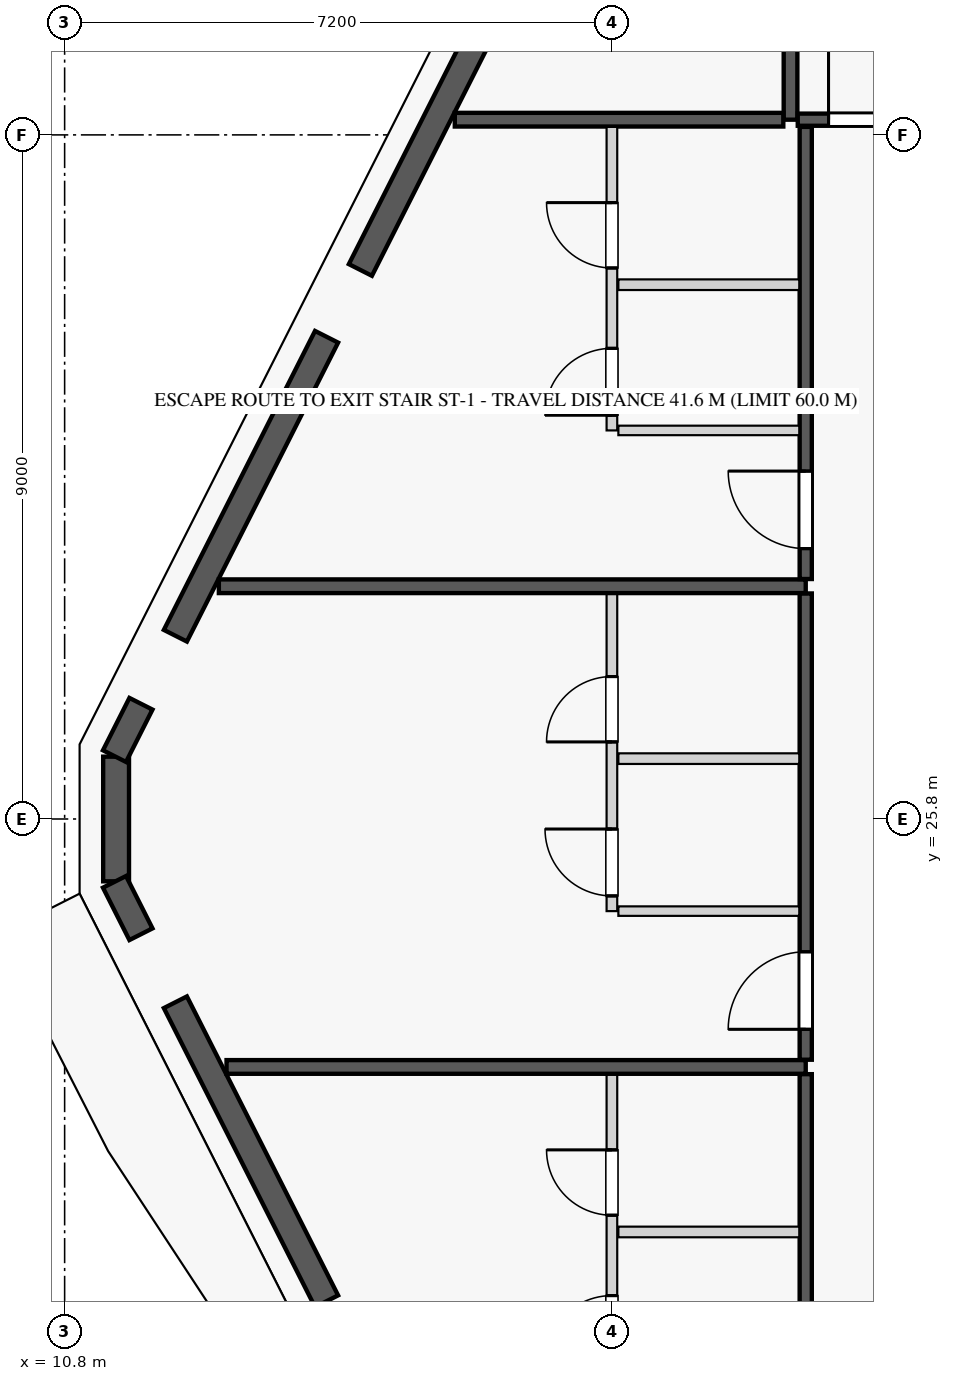
"""IFC4 building model, lengths in metres.
Left out: names, types, materials, properties, quantities, classifications, styles, units other than length and angle.
Written with IfcOpenShell. Run it as: python <this file> out.ifc"""

import sys

from ifc_helpers import new_model, si_unit, direction, frame, frame_2d, origin, origin_2d, place, context, subcontext, project, spatial, rectangle, extrude, element, fill, save


model = new_model("IFC4")
c1 = context("Model", 3, precision=1e-05, world=origin(), true_north=direction((0.0, 1.0)))
c2 = subcontext(c1, "Body", "Model", "MODEL_VIEW")
j1 = project(units=[si_unit("LENGTHUNIT", "METRE"), si_unit("PLANEANGLEUNIT", "RADIAN")], contexts=[c1])
p1 = place(None, origin())
s1 = spatial("IfcSite", under=j1, at=p1, CompositionType="ELEMENT")
p2 = place(p1, origin())
s2 = spatial("IfcBuilding", under=s1, at=p2, CompositionType="ELEMENT")
p3 = place(p2, frame((0.0, 0.0, 241.6)))
s3 = spatial("IfcBuildingStorey", under=s2, at=p3, CompositionType="ELEMENT", Elevation=241.6)
for number, where, z_axis, x_axis in (
    (1, (14.536, 32.567, 0.0), (0.0, 0.0, 1.0), (1.0, 0.0, 0.0)),
    (2, (12.063, 27.755, 0.0), (0.0, 0.0, 1.0), (1.0, 0.0, 0.0)),
    (3, (12.063, 23.845, 0.0), (0.0, 0.0, 1.0), (1.0, 0.0, 0.0)),
):
    element("IfcColumn", number, at=place(p3, frame(where, z_axis=z_axis, x_axis=x_axis)), inside=s3, PredefinedType="COLUMN", context=c2, shape_type="SweptSolid", body=[
        extrude(rectangle(XDim=0.75, YDim=0.75, at=origin_2d()), origin(), (0.0, 0.0, 1.0), 3.65),
    ])
p4 = place(p3, frame((12.063, 25.8, 0.0), z_axis=(0.0, 0.0, 1.0), x_axis=(0.0, -1.0, 0.0)))
e4 = element("IfcColumn", 4, at=p4, inside=s3, PredefinedType="PILASTER", context=c2, shape_type="SweptSolid", body=[
    extrude(rectangle(XDim=0.5, YDim=0.35, at=origin_2d()), origin(), (0.0, 0.0, 1.0), 3.65),
])
p5 = place(p3, frame((11.477, 26.62, 0.0), z_axis=(0.0, 0.0, 1.0), x_axis=(0.0, -1.0, 0.0)))
e5 = element("IfcWall", 5, at=p5, inside=s3, PredefinedType="STANDARD", context=c2, shape_type="SweptSolid", body=[
    extrude(rectangle(XDim=1.64, YDim=0.34, at=frame_2d((0.82, 0.0))), origin(), (0.0, 0.0, 1.0), 3.45),
])
p6 = place(p5, frame((0.27, 0.0, 0.75)))
e6 = element("IfcOpeningElement", 6, at=p6, cuts=e5, PredefinedType="OPENING", context=c2, shape_type="SweptSolid", body=[
    extrude(rectangle(XDim=1.1, YDim=2.0, at=frame_2d((0.55, 1.0))), frame((0.0, 0.18, 0.0), z_axis=(0.0, -1.0, 0.0), x_axis=(1.0, 0.0, 0.0)), (0.0, 0.0, 1.0), 0.36),
])
p7 = place(p3, frame((16.768, 37.127, 0.0), z_axis=(0.0, 0.0, 1.0), x_axis=(-0.451581819983, -0.892229712496, 0.0)))
e7 = element("IfcWall", 7, at=p7, inside=s3, PredefinedType="STANDARD", context=c2, shape_type="SweptSolid", body=[
    extrude(rectangle(XDim=4.6, YDim=0.34, at=frame_2d((2.3, 0.0))), origin(), (0.0, 0.0, 1.0), 2.983),
])
p8 = place(p7, frame((0.437, 0.0, 0.75)))
e8 = element("IfcOpeningElement", 8, at=p8, cuts=e7, PredefinedType="OPENING", context=c2, shape_type="SweptSolid", body=[
    extrude(rectangle(XDim=1.25, YDim=1.95, at=frame_2d((0.625, 0.975))), frame((0.0, 0.18, 0.0), z_axis=(0.0, -1.0, 0.0), x_axis=(1.0, 0.0, 0.0)), (0.0, 0.0, 1.0), 0.36),
])
p9 = place(p7, frame((2.963, 0.0, 0.75)))
e9 = element("IfcOpeningElement", 9, at=p9, cuts=e7, PredefinedType="OPENING", context=c2, shape_type="SweptSolid", body=[
    extrude(rectangle(XDim=1.1, YDim=2.0, at=frame_2d((0.55, 1.0))), frame((0.0, 0.18, 0.0), z_axis=(0.0, -1.0, 0.0), x_axis=(1.0, 0.0, 0.0)), (0.0, 0.0, 1.0), 0.36),
])
p10 = place(p3, frame((14.246, 32.144, 0.0), z_axis=(0.0, 0.0, 1.0), x_axis=(-0.451285866323, -0.892379441077, 0.0)))
e10 = element("IfcWall", 10, at=p10, inside=s3, PredefinedType="STANDARD", context=c2, shape_type="SweptSolid", body=[
    extrude(rectangle(XDim=4.407, YDim=0.34, at=frame_2d((2.204, 0.0))), origin(), (0.0, 0.0, 1.0), 2.983),
])
p11 = place(p10, frame((1.654, 0.0, 0.75)))
e11 = element("IfcOpeningElement", 11, at=p11, cuts=e10, PredefinedType="OPENING", context=c2, shape_type="SweptSolid", body=[
    extrude(rectangle(XDim=1.1, YDim=2.0, at=frame_2d((0.55, 1.0))), frame((0.0, 0.18, 0.0), z_axis=(0.0, -1.0, 0.0), x_axis=(1.0, 0.0, 0.0)), (0.0, 0.0, 1.0), 0.36),
])
for number, where, z_axis, x_axis in (
    (12, (11.804, 27.316, 0.0), (0.0, 0.0, 1.0), (-0.451, -0.893, 0.0)),
    (13, (11.456, 24.973, 0.0), (0.0, 0.0, 1.0), (0.451, -0.893, 0.0)),
):
    element("IfcWall", number, at=place(p3, frame(where, z_axis=z_axis, x_axis=x_axis)), inside=s3, PredefinedType="STANDARD", context=c2, shape_type="SweptSolid", body=[
        extrude(rectangle(XDim=0.772, YDim=0.34, at=frame_2d((0.386, 0.0))), origin(), (0.0, 0.0, 1.0), 3.45),
    ])
p12 = place(p3, frame((12.257, 23.389, 0.0), z_axis=(0.0, 0.0, 1.0), x_axis=(0.45130817501, -0.892368158984, 0.0)))
e14 = element("IfcWall", 14, at=p12, inside=s3, PredefinedType="STANDARD", context=c2, shape_type="SweptSolid", body=[
    extrude(rectangle(XDim=4.407, YDim=0.34, at=frame_2d((2.204, 0.0))), origin(), (0.0, 0.0, 1.0), 2.983),
])
p13 = place(p12, frame((1.579, 0.0, 0.75)))
e15 = element("IfcOpeningElement", 15, at=p13, cuts=e14, PredefinedType="OPENING", context=c2, shape_type="SweptSolid", body=[
    extrude(rectangle(XDim=1.25, YDim=1.95, at=frame_2d((0.625, 0.975))), frame((0.0, 0.18, 0.0), z_axis=(0.0, -1.0, 0.0), x_axis=(1.0, 0.0, 0.0)), (0.0, 0.0, 1.0), 0.36),
])
p14 = place(p3, frame((20.35, 35.0, 0.0), z_axis=(0.0, 0.0, 1.0), x_axis=(0.0, 1.0, 0.0)))
e16 = element("IfcWall", 16, at=p14, inside=s3, PredefinedType="PARTITIONING", context=c2, shape_type="SweptSolid", body=[
    extrude(rectangle(XDim=8.481, YDim=0.18, at=frame_2d((4.24, 0.0))), origin(), (0.0, 0.0, 1.0), 3.45),
])
p15 = place(p3, frame((20.445, 35.0, 0.0), z_axis=(0.0, 0.0, 1.0), x_axis=(1.0, 0.0, 0.0)))
e17 = element("IfcWall", 17, at=p15, inside=s3, PredefinedType="PARTITIONING", context=c2, shape_type="SweptSolid", body=[
    extrude(rectangle(XDim=23.91, YDim=0.16, at=frame_2d((11.955, 0.0))), origin(), (0.0, 0.0, 1.0), 3.45),
])
p16 = place(p15, frame((0.405, 0.0, 0.0)))
e18 = element("IfcOpeningElement", 18, at=p16, cuts=e17, PredefinedType="OPENING", context=c2, shape_type="SweptSolid", body=[
    extrude(rectangle(XDim=1.35, YDim=2.35, at=frame_2d((0.675, 1.175))), frame((0.0, 0.09, 0.0), z_axis=(0.0, -1.0, 0.0), x_axis=(1.0, 0.0, 0.0)), (0.0, 0.0, 1.0), 0.18),
])
p17 = place(p3, frame((15.933, 35.0, 0.0), z_axis=(0.0, 0.0, 1.0), x_axis=(1.0, 0.0, 0.0)))
e19 = element("IfcWall", 19, at=p17, inside=s3, PredefinedType="PARTITIONING", context=c2, shape_type="SweptSolid", body=[
    extrude(rectangle(XDim=4.322, YDim=0.18, at=frame_2d((2.161, 0.0))), origin(), (0.0, 0.0, 1.0), 3.45),
])
p18 = place(p3, frame((20.55, 16.495, 0.0), z_axis=(0.0, 0.0, 1.0), x_axis=(0.0, 1.0, 0.0)))
e20 = element("IfcWall", 20, at=p18, inside=s3, PredefinedType="PARTITIONING", context=c2, shape_type="SweptSolid", body=[
    extrude(rectangle(XDim=5.948, YDim=0.16, at=frame_2d((2.974, 0.0))), origin(), (0.0, 0.0, 1.0), 3.137),
])
p19 = place(p18, frame((0.4, 0.0, 0.0)))
e21 = element("IfcOpeningElement", 21, at=p19, cuts=e20, PredefinedType="OPENING", context=c2, shape_type="SweptSolid", body=[
    extrude(rectangle(XDim=1.02, YDim=2.25, at=frame_2d((0.51, 1.125))), frame((0.0, 0.09, 0.0), z_axis=(0.0, -1.0, 0.0), x_axis=(1.0, 0.0, 0.0)), (0.0, 0.0, 1.0), 0.18),
])
p20 = place(p3, frame((18.0, 18.45, 0.0), z_axis=(0.0, 0.0, 1.0), x_axis=(0.0, 1.0, 0.0)))
e22 = element("IfcWall", 22, at=p20, inside=s3, PredefinedType="PLUMBINGWALL", context=c2, shape_type="SweptSolid", body=[
    extrude(rectangle(XDim=3.993, YDim=0.14, at=frame_2d((1.997, 0.0))), origin(), (0.0, 0.0, 1.0), 3.45),
])
p21 = place(p20, frame((2.137, 0.0, 0.0)))
e23 = element("IfcOpeningElement", 23, at=p21, cuts=e22, PredefinedType="OPENING", context=c2, shape_type="SweptSolid", body=[
    extrude(rectangle(XDim=0.86, YDim=2.1, at=frame_2d((0.43, 1.05))), frame((0.0, 0.08, 0.0), z_axis=(0.0, -1.0, 0.0), x_axis=(1.0, 0.0, 0.0)), (0.0, 0.0, 1.0), 0.16),
])
p22 = place(p20, frame((0.2, 0.0, 0.0)))
e24 = element("IfcOpeningElement", 24, at=p22, cuts=e22, PredefinedType="OPENING", context=c2, shape_type="SweptSolid", body=[
    extrude(rectangle(XDim=0.88, YDim=2.15, at=frame_2d((0.44, 1.075))), frame((0.0, 0.08, 0.0), z_axis=(0.0, -1.0, 0.0), x_axis=(1.0, 0.0, 0.0)), (0.0, 0.0, 1.0), 0.16),
])
p23 = place(p3, frame((18.085, 20.367, 0.0), z_axis=(0.0, 0.0, 1.0), x_axis=(1.0, 0.0, 0.0)))
e25 = element("IfcWall", 25, at=p23, inside=s3, PredefinedType="PLUMBINGWALL", context=c2, shape_type="SweptSolid", body=[
    extrude(rectangle(XDim=2.38, YDim=0.14, at=frame_2d((1.19, 0.0))), origin(), (0.0, 0.0, 1.0), 3.45),
])
p24 = place(p3, frame((12.93, 22.538, 0.0), z_axis=(0.0, 0.0, 1.0), x_axis=(1.0, 0.0, 0.0)))
e26 = element("IfcWall", 26, at=p24, inside=s3, PredefinedType="PARTITIONING", context=c2, shape_type="SweptSolid", body=[
    extrude(rectangle(XDim=7.62, YDim=0.18, at=frame_2d((3.81, 0.0))), origin(), (0.0, 0.0, 1.0), 3.45),
])
p25 = place(p3, frame((20.55, 22.633, 0.0), z_axis=(0.0, 0.0, 1.0), x_axis=(0.0, 1.0, 0.0)))
e27 = element("IfcWall", 27, at=p25, inside=s3, PredefinedType="PARTITIONING", context=c2, shape_type="SweptSolid", body=[
    extrude(rectangle(XDim=6.134, YDim=0.16, at=frame_2d((3.067, 0.0))), origin(), (0.0, 0.0, 1.0), 3.137),
])
p26 = place(p25, frame((0.4, 0.0, 0.0)))
e28 = element("IfcOpeningElement", 28, at=p26, cuts=e27, PredefinedType="OPENING", context=c2, shape_type="SweptSolid", body=[
    extrude(rectangle(XDim=1.02, YDim=2.25, at=frame_2d((0.51, 1.125))), frame((0.0, 0.09, 0.0), z_axis=(0.0, -1.0, 0.0), x_axis=(1.0, 0.0, 0.0)), (0.0, 0.0, 1.0), 0.18),
])
p27 = place(p3, frame((18.085, 24.588, 0.0), z_axis=(0.0, 0.0, 1.0), x_axis=(1.0, 0.0, 0.0)))
e29 = element("IfcWall", 29, at=p27, inside=s3, PredefinedType="PARTITIONING", context=c2, shape_type="SweptSolid", body=[
    extrude(rectangle(XDim=2.38, YDim=0.125, at=frame_2d((1.19, 0.0))), origin(), (0.0, 0.0, 1.0), 3.45),
])
p28 = place(p3, frame((18.0, 24.588, 0.0), z_axis=(0.0, 0.0, 1.0), x_axis=(0.0, 1.0, 0.0)))
e30 = element("IfcWall", 30, at=p28, inside=s3, PredefinedType="PLUMBINGWALL", context=c2, shape_type="SweptSolid", body=[
    extrude(rectangle(XDim=4.179, YDim=0.14, at=frame_2d((2.09, 0.0))), origin(), (0.0, 0.0, 1.0), 3.45),
])
p29 = place(p28, frame((2.226, 0.0, 0.0)))
e31 = element("IfcOpeningElement", 31, at=p29, cuts=e30, PredefinedType="OPENING", context=c2, shape_type="SweptSolid", body=[
    extrude(rectangle(XDim=0.86, YDim=2.1, at=frame_2d((0.43, 1.05))), frame((0.0, 0.08, 0.0), z_axis=(0.0, -1.0, 0.0), x_axis=(1.0, 0.0, 0.0)), (0.0, 0.0, 1.0), 0.16),
])
p30 = place(p28, frame((0.2, 0.0, 0.0)))
e32 = element("IfcOpeningElement", 32, at=p30, cuts=e30, PredefinedType="OPENING", context=c2, shape_type="SweptSolid", body=[
    extrude(rectangle(XDim=0.88, YDim=2.15, at=frame_2d((0.44, 1.075))), frame((0.0, 0.08, 0.0), z_axis=(0.0, -1.0, 0.0), x_axis=(1.0, 0.0, 0.0)), (0.0, 0.0, 1.0), 0.16),
])
p31 = place(p3, frame((18.085, 26.594, 0.0), z_axis=(0.0, 0.0, 1.0), x_axis=(1.0, 0.0, 0.0)))
e33 = element("IfcWall", 33, at=p31, inside=s3, PredefinedType="PLUMBINGWALL", context=c2, shape_type="SweptSolid", body=[
    extrude(rectangle(XDim=2.38, YDim=0.14, at=frame_2d((1.19, 0.0))), origin(), (0.0, 0.0, 1.0), 3.45),
])
p32 = place(p3, frame((12.829, 28.862, 0.0), z_axis=(0.0, 0.0, 1.0), x_axis=(1.0, 0.0, 0.0)))
e34 = element("IfcWall", 34, at=p32, inside=s3, PredefinedType="PARTITIONING", context=c2, shape_type="SweptSolid", body=[
    extrude(rectangle(XDim=7.721, YDim=0.18, at=frame_2d((3.86, 0.0))), origin(), (0.0, 0.0, 1.0), 3.45),
])
p33 = place(p3, frame((20.55, 28.957, 0.0), z_axis=(0.0, 0.0, 1.0), x_axis=(0.0, 1.0, 0.0)))
e35 = element("IfcWall", 35, at=p33, inside=s3, PredefinedType="PARTITIONING", context=c2, shape_type="SweptSolid", body=[
    extrude(rectangle(XDim=5.948, YDim=0.16, at=frame_2d((2.974, 0.0))), origin(), (0.0, 0.0, 1.0), 3.137),
])
p34 = place(p33, frame((0.4, 0.0, 0.0)))
e36 = element("IfcOpeningElement", 36, at=p34, cuts=e35, PredefinedType="OPENING", context=c2, shape_type="SweptSolid", body=[
    extrude(rectangle(XDim=1.02, YDim=2.25, at=frame_2d((0.51, 1.125))), frame((0.0, 0.09, 0.0), z_axis=(0.0, -1.0, 0.0), x_axis=(1.0, 0.0, 0.0)), (0.0, 0.0, 1.0), 0.18),
])
p35 = place(p3, frame((18.085, 30.912, 0.0), z_axis=(0.0, 0.0, 1.0), x_axis=(1.0, 0.0, 0.0)))
e37 = element("IfcWall", 37, at=p35, inside=s3, PredefinedType="PARTITIONING", context=c2, shape_type="SweptSolid", body=[
    extrude(rectangle(XDim=2.38, YDim=0.125, at=frame_2d((1.19, 0.0))), origin(), (0.0, 0.0, 1.0), 3.45),
])
p36 = place(p3, frame((18.0, 30.912, 0.0), z_axis=(0.0, 0.0, 1.0), x_axis=(0.0, 1.0, 0.0)))
e38 = element("IfcWall", 38, at=p36, inside=s3, PredefinedType="PLUMBINGWALL", context=c2, shape_type="SweptSolid", body=[
    extrude(rectangle(XDim=3.993, YDim=0.14, at=frame_2d((1.997, 0.0))), origin(), (0.0, 0.0, 1.0), 3.45),
])
p37 = place(p36, frame((2.137, 0.0, 0.0)))
e39 = element("IfcOpeningElement", 39, at=p37, cuts=e38, PredefinedType="OPENING", context=c2, shape_type="SweptSolid", body=[
    extrude(rectangle(XDim=0.86, YDim=2.1, at=frame_2d((0.43, 1.05))), frame((0.0, 0.08, 0.0), z_axis=(0.0, -1.0, 0.0), x_axis=(1.0, 0.0, 0.0)), (0.0, 0.0, 1.0), 0.16),
])
p38 = place(p36, frame((0.2, 0.0, 0.0)))
e40 = element("IfcOpeningElement", 40, at=p38, cuts=e38, PredefinedType="OPENING", context=c2, shape_type="SweptSolid", body=[
    extrude(rectangle(XDim=0.88, YDim=2.15, at=frame_2d((0.44, 1.075))), frame((0.0, 0.08, 0.0), z_axis=(0.0, -1.0, 0.0), x_axis=(1.0, 0.0, 0.0)), (0.0, 0.0, 1.0), 0.16),
])
p39 = place(p3, frame((18.085, 32.829, 0.0), z_axis=(0.0, 0.0, 1.0), x_axis=(1.0, 0.0, 0.0)))
e41 = element("IfcWall", 41, at=p39, inside=s3, PredefinedType="PLUMBINGWALL", context=c2, shape_type="SweptSolid", body=[
    extrude(rectangle(XDim=2.38, YDim=0.14, at=frame_2d((1.19, 0.0))), origin(), (0.0, 0.0, 1.0), 3.45),
])
p40 = place(p8, origin())
e42 = element("IfcWindow", 42, at=p40, inside=s3, PartitioningType="SINGLE_PANEL", PredefinedType="WINDOW", context=c2, shape_type="SweptSolid", body=[
    extrude(rectangle(XDim=1.25, YDim=1.95, at=frame_2d((0.625, 0.975))), frame((0.0, 0.03, 0.0), z_axis=(0.0, -1.0, 0.0), x_axis=(1.0, 0.0, 0.0)), (0.0, 0.0, 1.0), 0.06),
])
fill(e8, e42)
p41 = place(p11, origin())
e43 = element("IfcWindow", 43, at=p41, inside=s3, PartitioningType="SINGLE_PANEL", PredefinedType="WINDOW", context=c2, shape_type="SweptSolid", body=[
    extrude(rectangle(XDim=1.1, YDim=2.0, at=frame_2d((0.55, 1.0))), frame((0.0, 0.03, 0.0), z_axis=(0.0, -1.0, 0.0), x_axis=(1.0, 0.0, 0.0)), (0.0, 0.0, 1.0), 0.06),
])
fill(e11, e43)
p42 = place(p13, origin())
e44 = element("IfcWindow", 44, at=p42, inside=s3, PartitioningType="SINGLE_PANEL", PredefinedType="WINDOW", context=c2, shape_type="SweptSolid", body=[
    extrude(rectangle(XDim=1.25, YDim=1.95, at=frame_2d((0.625, 0.975))), frame((0.0, 0.03, 0.0), z_axis=(0.0, -1.0, 0.0), x_axis=(1.0, 0.0, 0.0)), (0.0, 0.0, 1.0), 0.06),
])
fill(e15, e44)
p43 = place(p16, origin())
e45 = element("IfcDoor", 45, at=p43, inside=s3, OperationType="SINGLE_SWING_LEFT", PredefinedType="DOOR", context=c2, shape_type="SweptSolid", body=[
    extrude(rectangle(XDim=1.35, YDim=2.35, at=frame_2d((0.675, 1.175))), frame((0.0, 0.025, 0.0), z_axis=(0.0, -1.0, 0.0), x_axis=(1.0, 0.0, 0.0)), (0.0, 0.0, 1.0), 0.05),
])
fill(e18, e45)
p44 = place(p21, origin())
e46 = element("IfcDoor", 46, at=p44, inside=s3, OperationType="SINGLE_SWING_RIGHT", PredefinedType="DOOR", context=c2, shape_type="SweptSolid", body=[
    extrude(rectangle(XDim=0.86, YDim=2.1, at=frame_2d((0.43, 1.05))), frame((0.0, 0.025, 0.0), z_axis=(0.0, -1.0, 0.0), x_axis=(1.0, 0.0, 0.0)), (0.0, 0.0, 1.0), 0.05),
])
fill(e23, e46)
p45 = place(p22, origin())
e47 = element("IfcDoor", 47, at=p45, inside=s3, OperationType="SINGLE_SWING_LEFT", PredefinedType="DOOR", context=c2, shape_type="SweptSolid", body=[
    extrude(rectangle(XDim=0.88, YDim=2.15, at=frame_2d((0.44, 1.075))), frame((0.0, 0.025, 0.0), z_axis=(0.0, -1.0, 0.0), x_axis=(1.0, 0.0, 0.0)), (0.0, 0.0, 1.0), 0.05),
])
fill(e24, e47)
p46 = place(p29, origin())
e48 = element("IfcDoor", 48, at=p46, inside=s3, OperationType="SINGLE_SWING_LEFT", PredefinedType="DOOR", context=c2, shape_type="SweptSolid", body=[
    extrude(rectangle(XDim=0.86, YDim=2.1, at=frame_2d((0.43, 1.05))), frame((0.0, 0.025, 0.0), z_axis=(0.0, -1.0, 0.0), x_axis=(1.0, 0.0, 0.0)), (0.0, 0.0, 1.0), 0.05),
])
fill(e31, e48)
p47 = place(p26, origin())
e49 = element("IfcDoor", 49, at=p47, inside=s3, OperationType="SINGLE_SWING_LEFT", PredefinedType="DOOR", context=c2, shape_type="SweptSolid", body=[
    extrude(rectangle(XDim=1.02, YDim=2.25, at=frame_2d((0.51, 1.125))), frame((0.0, 0.025, 0.0), z_axis=(0.0, -1.0, 0.0), x_axis=(1.0, 0.0, 0.0)), (0.0, 0.0, 1.0), 0.05),
])
fill(e28, e49)
p48 = place(p30, origin())
e50 = element("IfcDoor", 50, at=p48, inside=s3, OperationType="SINGLE_SWING_RIGHT", PredefinedType="DOOR", context=c2, shape_type="SweptSolid", body=[
    extrude(rectangle(XDim=0.88, YDim=2.15, at=frame_2d((0.44, 1.075))), frame((0.0, 0.025, 0.0), z_axis=(0.0, -1.0, 0.0), x_axis=(1.0, 0.0, 0.0)), (0.0, 0.0, 1.0), 0.05),
])
fill(e32, e50)
p49 = place(p37, origin())
e51 = element("IfcDoor", 51, at=p49, inside=s3, OperationType="SINGLE_SWING_RIGHT", PredefinedType="DOOR", context=c2, shape_type="SweptSolid", body=[
    extrude(rectangle(XDim=0.86, YDim=2.1, at=frame_2d((0.43, 1.05))), frame((0.0, 0.025, 0.0), z_axis=(0.0, -1.0, 0.0), x_axis=(1.0, 0.0, 0.0)), (0.0, 0.0, 1.0), 0.05),
])
fill(e39, e51)
p50 = place(p34, origin())
e52 = element("IfcDoor", 52, at=p50, inside=s3, OperationType="SINGLE_SWING_RIGHT", PredefinedType="DOOR", context=c2, shape_type="SweptSolid", body=[
    extrude(rectangle(XDim=1.02, YDim=2.25, at=frame_2d((0.51, 1.125))), frame((0.0, 0.025, 0.0), z_axis=(0.0, -1.0, 0.0), x_axis=(1.0, 0.0, 0.0)), (0.0, 0.0, 1.0), 0.05),
])
fill(e36, e52)
p51 = place(p38, origin())
e53 = element("IfcDoor", 53, at=p51, inside=s3, OperationType="SINGLE_SWING_LEFT", PredefinedType="DOOR", context=c2, shape_type="SweptSolid", body=[
    extrude(rectangle(XDim=0.88, YDim=2.15, at=frame_2d((0.44, 1.075))), frame((0.0, 0.025, 0.0), z_axis=(0.0, -1.0, 0.0), x_axis=(1.0, 0.0, 0.0)), (0.0, 0.0, 1.0), 0.05),
])
fill(e40, e53)
p52 = place(p9, origin())
e54 = element("IfcWindow", 54, at=p52, inside=s3, PartitioningType="SINGLE_PANEL", PredefinedType="WINDOW", context=c2, shape_type="SweptSolid", body=[
    extrude(rectangle(XDim=1.1, YDim=2.0, at=frame_2d((0.55, 1.0))), frame((0.0, 0.03, 0.0), z_axis=(0.0, -1.0, 0.0), x_axis=(1.0, 0.0, 0.0)), (0.0, 0.0, 1.0), 0.06),
])
fill(e9, e54)
p53 = place(p6, origin())
e55 = element("IfcWindow", 55, at=p53, inside=s3, PartitioningType="SINGLE_PANEL", PredefinedType="WINDOW", context=c2, shape_type="SweptSolid", body=[
    extrude(rectangle(XDim=1.1, YDim=2.0, at=frame_2d((0.55, 1.0))), frame((0.0, 0.03, 0.0), z_axis=(0.0, -1.0, 0.0), x_axis=(1.0, 0.0, 0.0)), (0.0, 0.0, 1.0), 0.06),
])
fill(e6, e55)
save(model, sys.argv[1])
